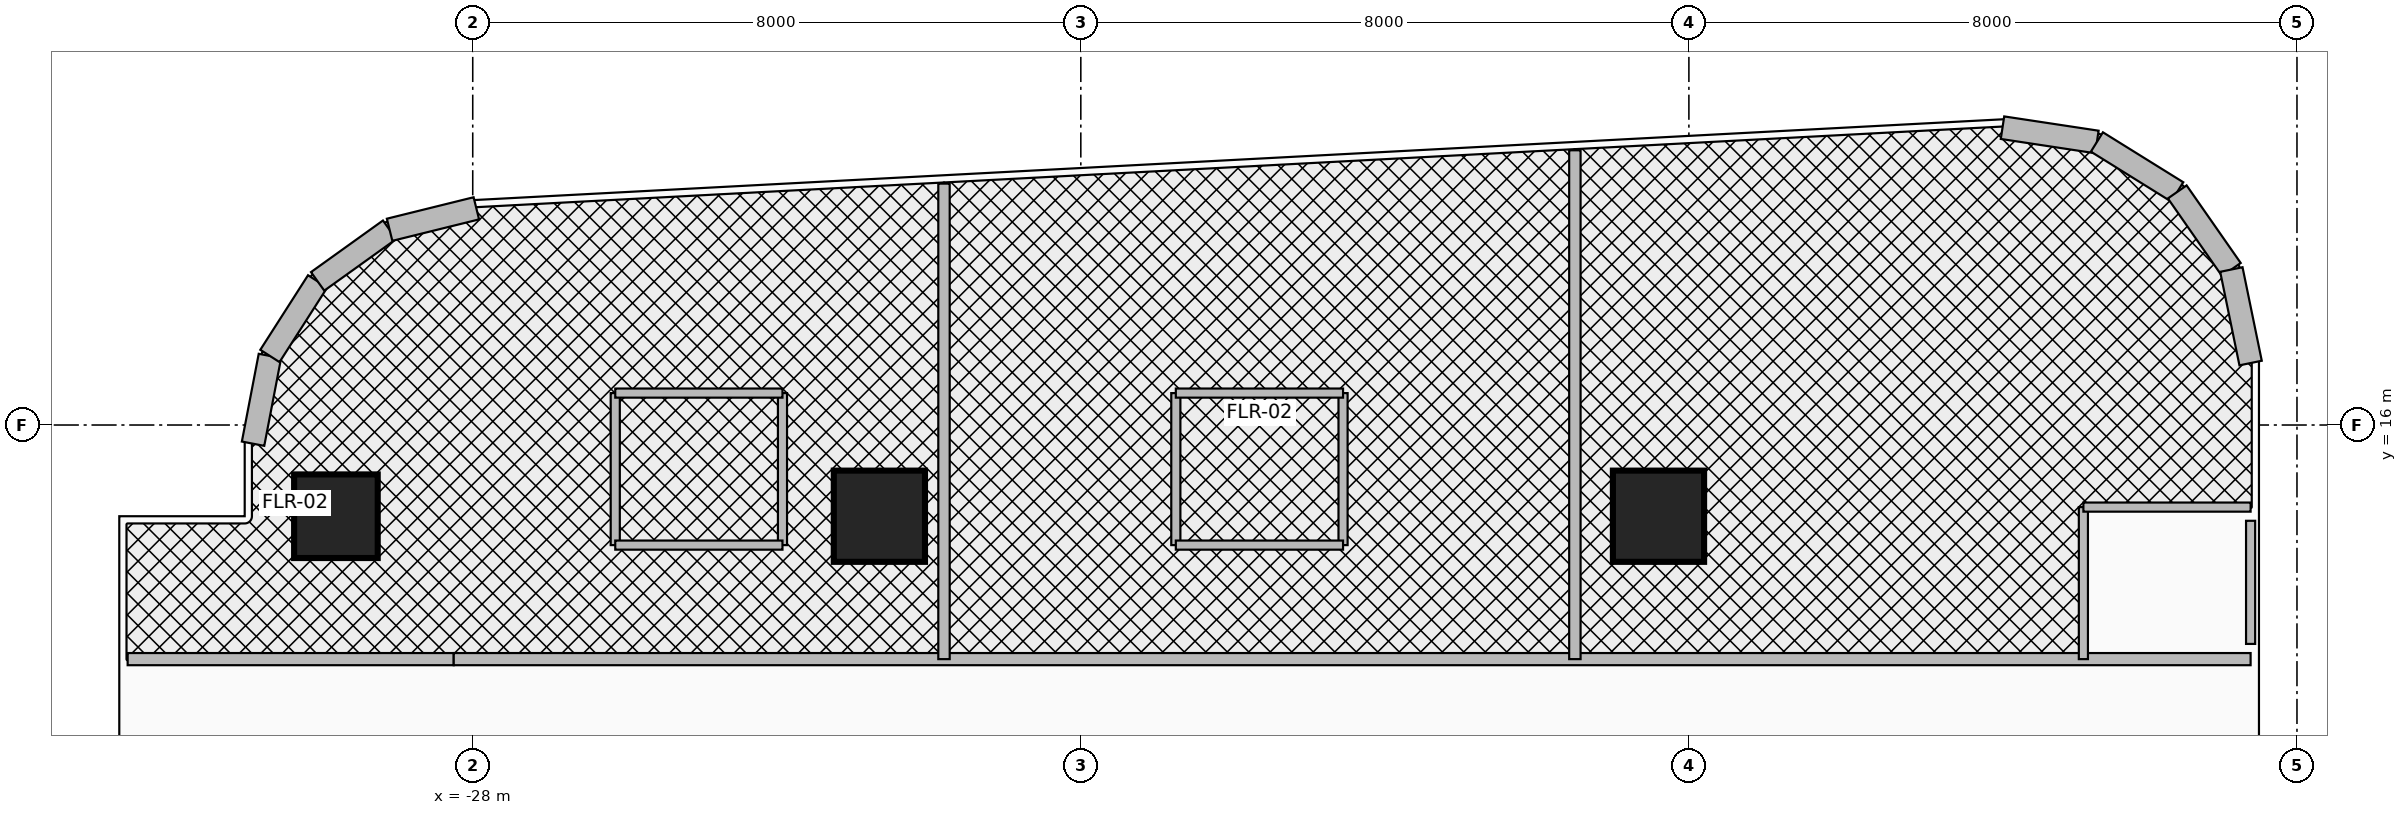
"""IFC4 building model, lengths in metres.
Left out: names, types, materials, properties, quantities, classifications, styles, units other than length and angle.
Written with IfcOpenShell. Run it as: python <this file> out.ifc"""

import sys

from ifc_helpers import new_model, si_unit, direction, frame, frame_2d, origin, origin_2d, place, context, subcontext, project, spatial, rectangle, circle, extrude, source, transform, mapped, element, fill, save


model = new_model("IFC4")
c1 = context("Model", 3, precision=1e-05, world=origin(), true_north=direction((0.0, 1.0)))
c2 = subcontext(c1, "Body", "Model", "MODEL_VIEW")
j1 = project(units=[si_unit("LENGTHUNIT", "METRE"), si_unit("PLANEANGLEUNIT", "RADIAN")], contexts=[c1])
p1 = place(None, origin())
s1 = spatial("IfcSite", under=j1, at=p1, CompositionType="ELEMENT")
p2 = place(p1, origin())
s2 = spatial("IfcBuilding", under=s1, at=p2, CompositionType="ELEMENT")
p3 = place(p2, frame((0.0, 0.0, 153.8)))
s3 = spatial("IfcBuildingStorey", under=s2, at=p3, CompositionType="ELEMENT", Elevation=153.8)
m1 = source(origin(), c2, "Body", "SweptSolid", [
    extrude(circle(Radius=0.55, at=origin_2d()), origin(), (0.0, 0.0, 1.0), 3.7),
])
p4 = place(p3, frame((-29.8, 14.8, 0.0), z_axis=(0.0, 0.0, 1.0), x_axis=(1.0, 0.0, 0.0)))
e1 = element("IfcColumn", 1, at=p4, inside=s3, PredefinedType="COLUMN", context=c2, shape_type="MappedRepresentation", body=[
    mapped(m1, transform((0.0, 0.0, 0.0), x_axis=(1.0, 0.0, 0.0), y_axis=(0.0, 1.0, 0.0), z_axis=(0.0, 0.0, 1.0), scale=1.0)),
])
m2 = source(origin(), c2, "Body", "SweptSolid", [
    extrude(rectangle(XDim=1.2, YDim=1.2, at=origin_2d()), origin(), (0.0, 0.0, 1.0), 3.7),
])
for number, where, z_axis, x_axis in (
    (2, (-22.65, 14.8, 0.0), (0.0, 0.0, 1.0), (1.0, 0.0, 0.0)),
    (3, (-12.4, 14.8, 0.0), (0.0, 0.0, 1.0), (1.0, 0.0, 0.0)),
):
    element("IfcColumn", number, at=place(p3, frame(where, z_axis=z_axis, x_axis=x_axis)), inside=s3, PredefinedType="COLUMN", context=c2, shape_type="MappedRepresentation", body=[
        mapped(m2, transform((0.0, 0.0, 0.0), x_axis=(1.0, 0.0, 0.0), y_axis=(0.0, 1.0, 0.0), z_axis=(0.0, 0.0, 1.0), scale=1.0)),
    ])
p5 = place(p3, frame((-30.89, 15.754, 0.0), z_axis=(0.0, 0.0, 1.0), x_axis=(0.188562397879, 0.982061210977, 0.0)))
e4 = element("IfcWall", 4, at=p5, inside=s3, PredefinedType="SOLIDWALL", context=c2, shape_type="SweptSolid", body=[
    extrude(rectangle(XDim=1.176, YDim=0.3, at=frame_2d((0.588, 0.0))), origin(), (0.0, 0.0, 1.0), 3.46),
])
for number, where, z_axis, x_axis in (
    (5, (-30.668, 16.909, 0.0), (0.0, 0.0, 1.0), (0.539, 0.842, 0.0)),
    (6, (-30.04, 17.89, 0.0), (0.0, 0.0, 1.0), (0.813, 0.583, 0.0)),
):
    element("IfcWall", number, at=place(p3, frame(where, z_axis=z_axis, x_axis=x_axis)), inside=s3, PredefinedType="SOLIDWALL", context=c2, shape_type="SweptSolid", body=[
        extrude(rectangle(XDim=1.165, YDim=0.3, at=frame_2d((0.583, 0.0))), origin(), (0.0, 0.0, 1.0), 3.46),
    ])
p6 = place(p3, frame((-29.094, 18.569, 0.0), z_axis=(0.0, 0.0, 1.0), x_axis=(0.970762249107, 0.24004302887, 0.0)))
e7 = element("IfcWall", 7, at=p6, inside=s3, PredefinedType="SOLIDWALL", context=c2, shape_type="SweptSolid", body=[
    extrude(rectangle(XDim=1.176, YDim=0.3, at=frame_2d((0.588, 0.0))), origin(), (0.0, 0.0, 1.0), 3.46),
])
p7 = place(p3, frame((-7.874, 19.912, 0.0), z_axis=(0.0, 0.0, 1.0), x_axis=(0.988741655411, -0.149632679769, 0.0)))
e8 = element("IfcWall", 8, at=p7, inside=s3, PredefinedType="SOLIDWALL", context=c2, shape_type="SweptSolid", body=[
    extrude(rectangle(XDim=1.256, YDim=0.3, at=frame_2d((0.628, 0.0))), origin(), (0.0, 0.0, 1.0), 3.46),
])
p8 = place(p3, frame((-6.632, 19.724, 0.0), z_axis=(0.0, 0.0, 1.0), x_axis=(0.849285325289, -0.527934121126, 0.0)))
e9 = element("IfcWall", 9, at=p8, inside=s3, PredefinedType="SOLIDWALL", context=c2, shape_type="SweptSolid", body=[
    extrude(rectangle(XDim=1.244, YDim=0.3, at=frame_2d((0.622, 0.0))), origin(), (0.0, 0.0, 1.0), 3.46),
])
p9 = place(p3, frame((-5.575, 19.067, 0.0), z_axis=(0.0, 0.0, 1.0), x_axis=(0.571960670617, -0.820281044074, 0.0)))
e10 = element("IfcWall", 10, at=p9, inside=s3, PredefinedType="SOLIDWALL", context=c2, shape_type="SweptSolid", body=[
    extrude(rectangle(XDim=1.245, YDim=0.3, at=frame_2d((0.622, 0.0))), origin(), (0.0, 0.0, 1.0), 3.46),
])
p10 = place(p3, frame((-4.863, 18.046, 0.0), z_axis=(0.0, 0.0, 1.0), x_axis=(0.201532282172, -0.97948187285, 0.0)))
e11 = element("IfcWall", 11, at=p10, inside=s3, PredefinedType="SOLIDWALL", context=c2, shape_type="SweptSolid", body=[
    extrude(rectangle(XDim=1.256, YDim=0.3, at=frame_2d((0.628, 0.0))), origin(), (0.0, 0.0, 1.0), 3.46),
])
p11 = place(p3, frame((-32.54, 12.92, 0.0), z_axis=(0.0, 0.0, 1.0), x_axis=(1.0, 0.0, 0.0)))
e12 = element("IfcWall", 12, at=p11, inside=s3, PredefinedType="PARTITIONING", context=c2, shape_type="SweptSolid", body=[
    extrude(rectangle(XDim=4.29, YDim=0.16, at=frame_2d((2.145, 0.0))), origin(), (0.0, 0.0, 1.0), 2.896),
])
p12 = place(p3, frame((-28.25, 12.92, 0.0), z_axis=(0.0, 0.0, 1.0), x_axis=(1.0, 0.0, 0.0)))
e13 = element("IfcWall", 13, at=p12, inside=s3, PredefinedType="PARTITIONING", context=c2, shape_type="SweptSolid", body=[
    extrude(rectangle(XDim=23.64, YDim=0.16, at=frame_2d((11.82, 0.0))), origin(), (0.0, 0.0, 1.0), 2.834),
])
p13 = place(p12, frame((2.75, 0.0, 0.0)))
e14 = element("IfcOpeningElement", 14, at=p13, cuts=e13, PredefinedType="OPENING", context=c2, shape_type="SweptSolid", body=[
    extrude(rectangle(XDim=0.95, YDim=2.15, at=frame_2d((0.475, 1.075))), frame((0.0, 0.095, 0.0), z_axis=(0.0, -1.0, 0.0), x_axis=(1.0, 0.0, 0.0)), (0.0, 0.0, 1.0), 0.19),
])
p14 = place(p12, frame((10.125, 0.0, 0.0)))
e15 = element("IfcOpeningElement", 15, at=p14, cuts=e13, PredefinedType="OPENING", context=c2, shape_type="SweptSolid", body=[
    extrude(rectangle(XDim=0.95, YDim=2.15, at=frame_2d((0.475, 1.075))), frame((0.0, 0.095, 0.0), z_axis=(0.0, -1.0, 0.0), x_axis=(1.0, 0.0, 0.0)), (0.0, 0.0, 1.0), 0.19),
])
p15 = place(p12, frame((17.62, 0.0, 0.0)))
e16 = element("IfcOpeningElement", 16, at=p15, cuts=e13, PredefinedType="OPENING", context=c2, shape_type="SweptSolid", body=[
    extrude(rectangle(XDim=0.95, YDim=2.15, at=frame_2d((0.475, 1.075))), frame((0.0, 0.095, 0.0), z_axis=(0.0, -1.0, 0.0), x_axis=(1.0, 0.0, 0.0)), (0.0, 0.0, 1.0), 0.19),
])
p16 = place(p3, frame((-21.8, 12.92, 0.0), z_axis=(0.0, 0.0, 1.0), x_axis=(0.0, 1.0, 0.0)))
e17 = element("IfcWall", 17, at=p16, inside=s3, PredefinedType="PARTITIONING", context=c2, shape_type="SweptSolid", body=[
    extrude(rectangle(XDim=6.256, YDim=0.15, at=frame_2d((3.128, 0.0))), origin(), (0.0, 0.0, 1.0), 2.666),
])
p17 = place(p3, frame((-13.5, 12.92, 0.0), z_axis=(0.0, 0.0, 1.0), x_axis=(0.0, 1.0, 0.0)))
e18 = element("IfcWall", 18, at=p17, inside=s3, PredefinedType="PARTITIONING", context=c2, shape_type="SweptSolid", body=[
    extrude(rectangle(XDim=6.694, YDim=0.15, at=frame_2d((3.347, 0.0))), origin(), (0.0, 0.0, 1.0), 2.666),
])
for number, where, z_axis, x_axis in (
    (19, (-26.125, 14.42, 0.0), (0.0, 0.0, 1.0), (0.0, 1.0, 0.0)),
    (20, (-23.925, 14.42, 0.0), (0.0, 0.0, 1.0), (0.0, 1.0, 0.0)),
):
    element("IfcWall", number, at=place(p3, frame(where, z_axis=z_axis, x_axis=x_axis)), inside=s3, PredefinedType="PARTITIONING", context=c2, shape_type="SweptSolid", body=[
        extrude(rectangle(XDim=2.0, YDim=0.12, at=frame_2d((1.0, 0.0))), origin(), (0.0, 0.0, 1.0), 2.666),
    ])
p18 = place(p3, frame((-26.125, 16.42, 0.0), z_axis=(0.0, 0.0, 1.0), x_axis=(1.0, 0.0, 0.0)))
e21 = element("IfcWall", 21, at=p18, inside=s3, PredefinedType="PARTITIONING", context=c2, shape_type="SweptSolid", body=[
    extrude(rectangle(XDim=2.2, YDim=0.12, at=frame_2d((1.1, 0.0))), origin(), (0.0, 0.0, 1.0), 3.46),
])
p19 = place(p3, frame((-26.125, 14.42, 0.0), z_axis=(0.0, 0.0, 1.0), x_axis=(1.0, 0.0, 0.0)))
e22 = element("IfcWall", 22, at=p19, inside=s3, PredefinedType="PARTITIONING", context=c2, shape_type="SweptSolid", body=[
    extrude(rectangle(XDim=2.2, YDim=0.12, at=frame_2d((1.1, 0.0))), origin(), (0.0, 0.0, 1.0), 3.46),
])
p20 = place(p19, frame((0.675, 0.0, 0.0)))
e23 = element("IfcOpeningElement", 23, at=p20, cuts=e22, PredefinedType="OPENING", context=c2, shape_type="SweptSolid", body=[
    extrude(rectangle(XDim=0.85, YDim=2.1, at=frame_2d((0.425, 1.05))), frame((0.0, 0.075, 0.0), z_axis=(0.0, -1.0, 0.0), x_axis=(1.0, 0.0, 0.0)), (0.0, 0.0, 1.0), 0.15),
])
for number, where, z_axis, x_axis in (
    (24, (-18.75, 14.42, 0.0), (0.0, 0.0, 1.0), (0.0, 1.0, 0.0)),
    (25, (-16.55, 14.42, 0.0), (0.0, 0.0, 1.0), (0.0, 1.0, 0.0)),
):
    element("IfcWall", number, at=place(p3, frame(where, z_axis=z_axis, x_axis=x_axis)), inside=s3, PredefinedType="PARTITIONING", context=c2, shape_type="SweptSolid", body=[
        extrude(rectangle(XDim=2.0, YDim=0.12, at=frame_2d((1.0, 0.0))), origin(), (0.0, 0.0, 1.0), 2.666),
    ])
p21 = place(p3, frame((-18.75, 16.42, 0.0), z_axis=(0.0, 0.0, 1.0), x_axis=(1.0, 0.0, 0.0)))
e26 = element("IfcWall", 26, at=p21, inside=s3, PredefinedType="PARTITIONING", context=c2, shape_type="SweptSolid", body=[
    extrude(rectangle(XDim=2.2, YDim=0.12, at=frame_2d((1.1, 0.0))), origin(), (0.0, 0.0, 1.0), 3.46),
])
p22 = place(p3, frame((-18.75, 14.42, 0.0), z_axis=(0.0, 0.0, 1.0), x_axis=(1.0, 0.0, 0.0)))
e27 = element("IfcWall", 27, at=p22, inside=s3, PredefinedType="PARTITIONING", context=c2, shape_type="SweptSolid", body=[
    extrude(rectangle(XDim=2.2, YDim=0.12, at=frame_2d((1.1, 0.0))), origin(), (0.0, 0.0, 1.0), 3.46),
])
p23 = place(p22, frame((0.675, 0.0, 0.0)))
e28 = element("IfcOpeningElement", 28, at=p23, cuts=e27, PredefinedType="OPENING", context=c2, shape_type="SweptSolid", body=[
    extrude(rectangle(XDim=0.85, YDim=2.1, at=frame_2d((0.425, 1.05))), frame((0.0, 0.075, 0.0), z_axis=(0.0, -1.0, 0.0), x_axis=(1.0, 0.0, 0.0)), (0.0, 0.0, 1.0), 0.15),
])
p24 = place(p3, frame((-6.81, 12.92, 0.0), z_axis=(0.0, 0.0, 1.0), x_axis=(0.0, 1.0, 0.0)))
e29 = element("IfcWall", 29, at=p24, inside=s3, PredefinedType="PARTITIONING", context=c2, shape_type="SweptSolid", body=[
    extrude(rectangle(XDim=2.0, YDim=0.12, at=frame_2d((1.0, 0.0))), origin(), (0.0, 0.0, 1.0), 3.46),
])
p25 = place(p3, frame((-6.81, 14.92, 0.0), z_axis=(0.0, 0.0, 1.0), x_axis=(1.0, 0.0, 0.0)))
e30 = element("IfcWall", 30, at=p25, inside=s3, PredefinedType="PARTITIONING", context=c2, shape_type="SweptSolid", body=[
    extrude(rectangle(XDim=2.2, YDim=0.12, at=frame_2d((1.1, 0.0))), origin(), (0.0, 0.0, 1.0), 3.46),
])
p26 = place(p25, frame((0.675, 0.0, 0.0)))
e31 = element("IfcOpeningElement", 31, at=p26, cuts=e30, PredefinedType="OPENING", context=c2, shape_type="SweptSolid", body=[
    extrude(rectangle(XDim=0.85, YDim=2.1, at=frame_2d((0.425, 1.05))), frame((0.0, 0.075, 0.0), z_axis=(0.0, -1.0, 0.0), x_axis=(1.0, 0.0, 0.0)), (0.0, 0.0, 1.0), 0.15),
])
p27 = place(p3, frame((-4.61, 13.12, 0.0), z_axis=(0.0, 0.0, 1.0), x_axis=(0.0, 1.0, 0.0)))
e32 = element("IfcWall", 32, at=p27, inside=s3, PredefinedType="PARTITIONING", context=c2, shape_type="SweptSolid", body=[
    extrude(rectangle(XDim=1.62, YDim=0.12, at=frame_2d((0.81, 0.0))), origin(), (0.0, 0.0, 1.0), 3.46),
])
p28 = place(p13, frame((0.95, 0.0, 0.0), z_axis=(0.0, 0.0, 1.0), x_axis=(-1.0, 0.0, 0.0)))
e33 = element("IfcDoor", 33, at=p28, inside=s3, OperationType="SINGLE_SWING_LEFT", PredefinedType="DOOR", context=c2, shape_type="SweptSolid", body=[
    extrude(rectangle(XDim=0.95, YDim=2.15, at=frame_2d((0.475, 1.075))), frame((0.0, 0.025, 0.0), z_axis=(0.0, -1.0, 0.0), x_axis=(1.0, 0.0, 0.0)), (0.0, 0.0, 1.0), 0.05),
])
fill(e14, e33)
p29 = place(p20, origin())
e34 = element("IfcDoor", 34, at=p29, inside=s3, OperationType="SINGLE_SWING_RIGHT", PredefinedType="DOOR", context=c2, shape_type="SweptSolid", body=[
    extrude(rectangle(XDim=0.85, YDim=2.1, at=frame_2d((0.425, 1.05))), frame((0.0, 0.025, 0.0), z_axis=(0.0, -1.0, 0.0), x_axis=(1.0, 0.0, 0.0)), (0.0, 0.0, 1.0), 0.05),
])
fill(e23, e34)
p30 = place(p14, frame((0.95, 0.0, 0.0), z_axis=(0.0, 0.0, 1.0), x_axis=(-1.0, 0.0, 0.0)))
e35 = element("IfcDoor", 35, at=p30, inside=s3, OperationType="SINGLE_SWING_LEFT", PredefinedType="DOOR", context=c2, shape_type="SweptSolid", body=[
    extrude(rectangle(XDim=0.95, YDim=2.15, at=frame_2d((0.475, 1.075))), frame((0.0, 0.025, 0.0), z_axis=(0.0, -1.0, 0.0), x_axis=(1.0, 0.0, 0.0)), (0.0, 0.0, 1.0), 0.05),
])
fill(e15, e35)
p31 = place(p23, origin())
e36 = element("IfcDoor", 36, at=p31, inside=s3, OperationType="SINGLE_SWING_RIGHT", PredefinedType="DOOR", context=c2, shape_type="SweptSolid", body=[
    extrude(rectangle(XDim=0.85, YDim=2.1, at=frame_2d((0.425, 1.05))), frame((0.0, 0.025, 0.0), z_axis=(0.0, -1.0, 0.0), x_axis=(1.0, 0.0, 0.0)), (0.0, 0.0, 1.0), 0.05),
])
fill(e28, e36)
p32 = place(p15, frame((0.95, 0.0, 0.0), z_axis=(0.0, 0.0, 1.0), x_axis=(-1.0, 0.0, 0.0)))
e37 = element("IfcDoor", 37, at=p32, inside=s3, OperationType="SINGLE_SWING_LEFT", PredefinedType="DOOR", context=c2, shape_type="SweptSolid", body=[
    extrude(rectangle(XDim=0.95, YDim=2.15, at=frame_2d((0.475, 1.075))), frame((0.0, 0.025, 0.0), z_axis=(0.0, -1.0, 0.0), x_axis=(1.0, 0.0, 0.0)), (0.0, 0.0, 1.0), 0.05),
])
fill(e16, e37)
p33 = place(p26, origin())
e38 = element("IfcDoor", 38, at=p33, inside=s3, OperationType="SINGLE_SWING_RIGHT", PredefinedType="DOOR", context=c2, shape_type="SweptSolid", body=[
    extrude(rectangle(XDim=0.85, YDim=2.1, at=frame_2d((0.425, 1.05))), frame((0.0, 0.025, 0.0), z_axis=(0.0, -1.0, 0.0), x_axis=(1.0, 0.0, 0.0)), (0.0, 0.0, 1.0), 0.05),
])
fill(e31, e38)
save(model, sys.argv[1])
